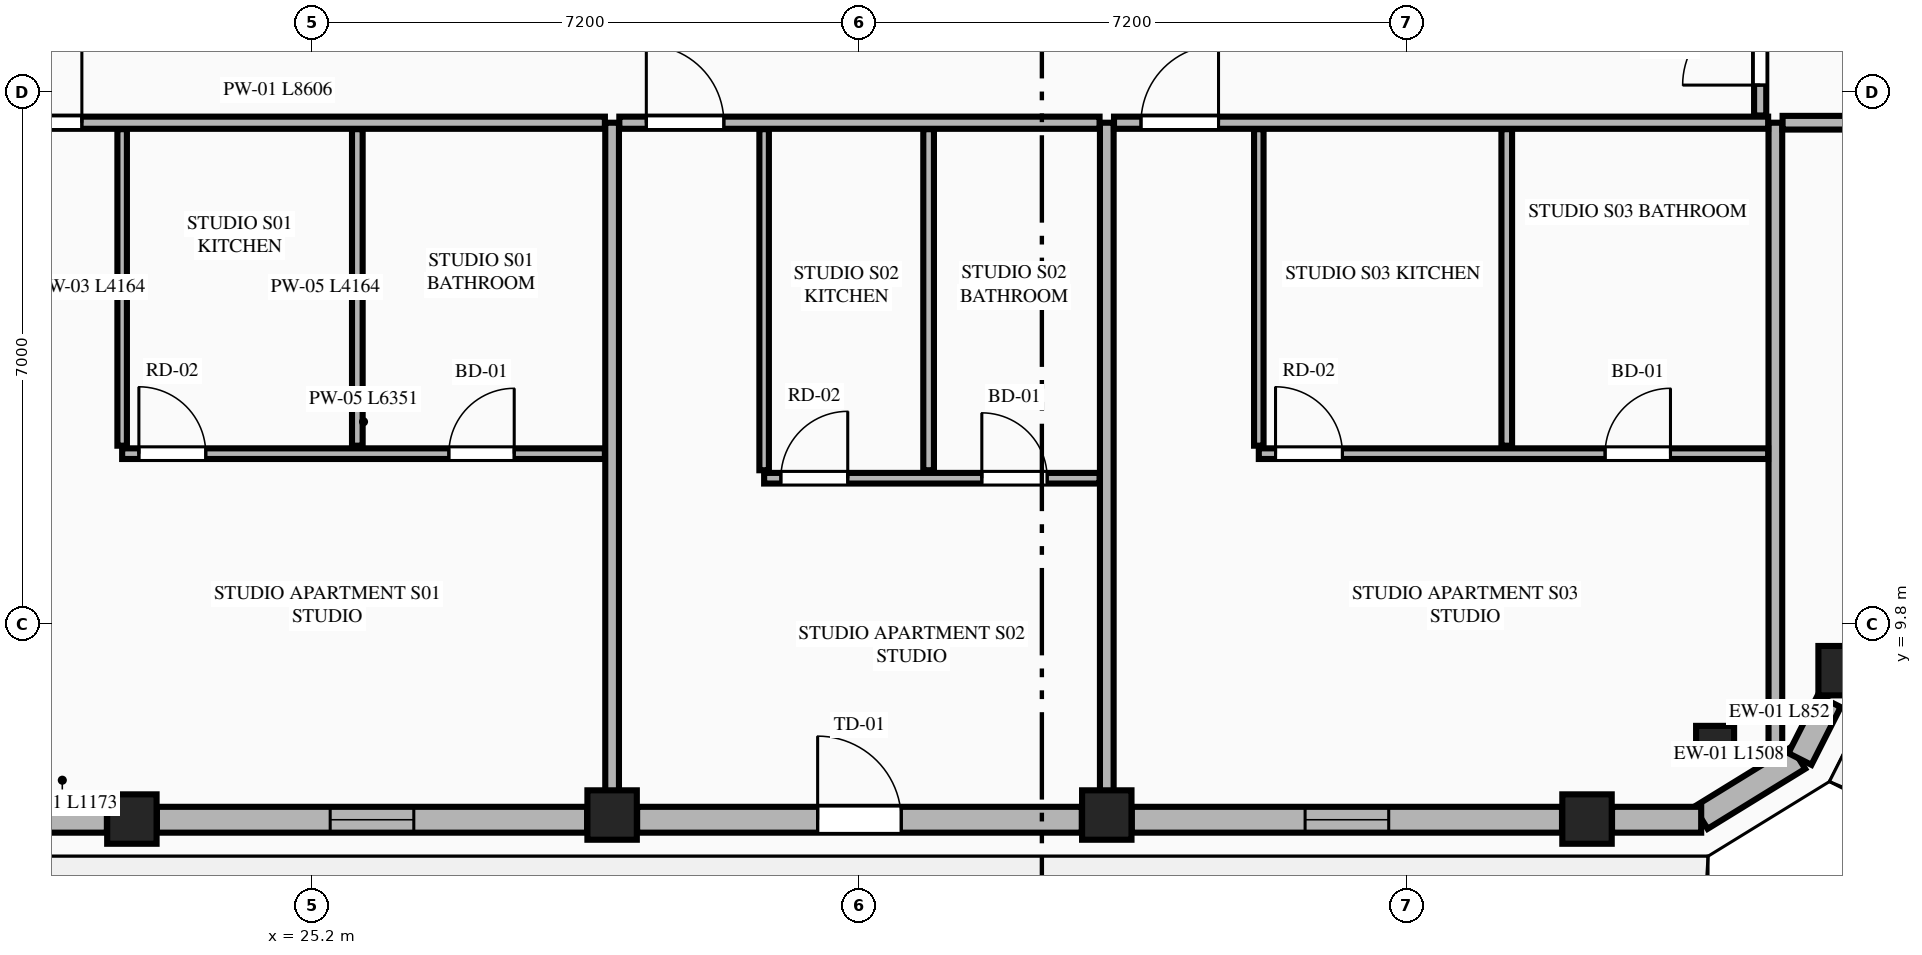
"""IFC4 building model, lengths in metres.
Left out: names, types, materials, properties, quantities, classifications, styles, units other than length and angle.
Written with IfcOpenShell. Run it as: python <this file> out.ifc"""

import sys

from ifc_helpers import new_model, si_unit, direction, frame, frame_2d, origin, origin_2d, place, context, subcontext, project, spatial, rectangle, extrude, element, fill, save


model = new_model("IFC4")
c1 = context("Model", 3, precision=1e-05, world=origin(), true_north=direction((0.0, 1.0)))
c2 = subcontext(c1, "Body", "Model", "MODEL_VIEW")
j1 = project(units=[si_unit("LENGTHUNIT", "METRE"), si_unit("PLANEANGLEUNIT", "RADIAN")], contexts=[c1])
p1 = place(None, origin())
s1 = spatial("IfcSite", under=j1, at=p1, CompositionType="ELEMENT")
p2 = place(p1, origin())
s2 = spatial("IfcBuilding", under=s1, at=p2, CompositionType="ELEMENT")
p3 = place(p2, frame((0.0, 0.0, 274.45)))
s3 = spatial("IfcBuildingStorey", under=s2, at=p3, CompositionType="ELEMENT", Elevation=274.45)
for number, where, z_axis, x_axis in (
    (1, (22.828, 7.239, 0.0), (0.0, 0.0, 1.0), (1.0, 0.0, 0.0)),
    (2, (29.146, 7.292, 0.0), (0.0, 0.0, 1.0), (1.0, 0.0, 0.0)),
    (3, (35.654, 7.292, 0.0), (0.0, 0.0, 1.0), (1.0, 0.0, 0.0)),
    (4, (41.972, 7.239, 0.0), (0.0, 0.0, 1.0), (1.0, 0.0, 0.0)),
    (5, (45.341, 9.191, 0.0), (0.0, 0.0, 1.0), (1.0, 0.0, 0.0)),
):
    element("IfcColumn", number, at=place(p3, frame(where, z_axis=z_axis, x_axis=x_axis)), inside=s3, PredefinedType="COLUMN", context=c2, shape_type="SweptSolid", body=[
        extrude(rectangle(XDim=0.65, YDim=0.65, at=origin_2d()), origin(), (0.0, 0.0, 1.0), 3.65),
    ])
p4 = place(p3, frame((43.657, 8.215, 0.0), z_axis=(0.0, 0.0, 1.0), x_axis=(0.865256437757, 0.501329529272, 0.0)))
e6 = element("IfcColumn", 6, at=p4, inside=s3, PredefinedType="PILASTER", context=c2, shape_type="SweptSolid", body=[
    extrude(rectangle(XDim=0.5, YDim=0.35, at=origin_2d()), origin(), (0.0, 0.0, 1.0), 3.65),
])
p5 = place(p3, frame((43.469, 7.255, 0.0), z_axis=(0.0, 0.0, 1.0), x_axis=(0.851680557619, 0.52406128246, 0.0)))
e7 = element("IfcWall", 7, at=p5, inside=s3, PredefinedType="STANDARD", context=c2, shape_type="SweptSolid", body=[
    extrude(rectangle(XDim=1.508, YDim=0.34, at=frame_2d((0.754, 0.0))), origin(), (0.0, 0.0, 1.0), 3.37),
])
p6 = place(p3, frame((21.326, 7.23, 0.0), z_axis=(0.0, 0.0, 1.0), x_axis=(1.0, 0.0, 0.0)))
e8 = element("IfcWall", 8, at=p6, inside=s3, PredefinedType="STANDARD", context=c2, shape_type="SweptSolid", body=[
    extrude(rectangle(XDim=1.173, YDim=0.34, at=frame_2d((0.586, 0.0))), origin(), (0.0, 0.0, 1.0), 3.37),
])
p7 = place(p3, frame((23.157, 7.23, 0.0), z_axis=(0.0, 0.0, 1.0), x_axis=(1.0, 0.0, 0.0)))
e9 = element("IfcWall", 9, at=p7, inside=s3, PredefinedType="STANDARD", context=c2, shape_type="SweptSolid", body=[
    extrude(rectangle(XDim=5.66, YDim=0.34, at=frame_2d((2.83, 0.0))), origin(), (0.0, 0.0, 1.0), 2.46),
])
p8 = place(p7, frame((2.28, 0.0, 0.75)))
e10 = element("IfcOpeningElement", 10, at=p8, cuts=e9, PredefinedType="OPENING", context=c2, shape_type="SweptSolid", body=[
    extrude(rectangle(XDim=1.1, YDim=1.56, at=frame_2d((0.55, 0.78))), frame((0.0, 0.18, 0.0), z_axis=(0.0, -1.0, 0.0), x_axis=(1.0, 0.0, 0.0)), (0.0, 0.0, 1.0), 0.36),
])
p9 = place(p3, frame((29.475, 7.23, 0.0), z_axis=(0.0, 0.0, 1.0), x_axis=(1.0, 0.0, 0.0)))
e11 = element("IfcWall", 11, at=p9, inside=s3, PredefinedType="STANDARD", context=c2, shape_type="SweptSolid", body=[
    extrude(rectangle(XDim=5.85, YDim=0.34, at=frame_2d((2.925, 0.0))), origin(), (0.0, 0.0, 1.0), 2.46),
])
p10 = place(p9, frame((2.375, 0.0, 0.0)))
e12 = element("IfcOpeningElement", 12, at=p10, cuts=e11, PredefinedType="OPENING", context=c2, shape_type="SweptSolid", body=[
    extrude(rectangle(XDim=1.1, YDim=2.25, at=frame_2d((0.55, 1.125))), frame((0.0, 0.18, 0.0), z_axis=(0.0, -1.0, 0.0), x_axis=(1.0, 0.0, 0.0)), (0.0, 0.0, 1.0), 0.36),
])
p11 = place(p3, frame((35.983, 7.23, 0.0), z_axis=(0.0, 0.0, 1.0), x_axis=(1.0, 0.0, 0.0)))
e13 = element("IfcWall", 13, at=p11, inside=s3, PredefinedType="STANDARD", context=c2, shape_type="SweptSolid", body=[
    extrude(rectangle(XDim=5.66, YDim=0.34, at=frame_2d((2.83, 0.0))), origin(), (0.0, 0.0, 1.0), 2.46),
])
p12 = place(p11, frame((2.28, 0.0, 0.75)))
e14 = element("IfcOpeningElement", 14, at=p12, cuts=e13, PredefinedType="OPENING", context=c2, shape_type="SweptSolid", body=[
    extrude(rectangle(XDim=1.1, YDim=1.56, at=frame_2d((0.55, 0.78))), frame((0.0, 0.18, 0.0), z_axis=(0.0, -1.0, 0.0), x_axis=(1.0, 0.0, 0.0)), (0.0, 0.0, 1.0), 0.36),
])
p13 = place(p3, frame((42.301, 7.23, 0.0), z_axis=(0.0, 0.0, 1.0), x_axis=(1.0, 0.0, 0.0)))
e15 = element("IfcWall", 15, at=p13, inside=s3, PredefinedType="STANDARD", context=c2, shape_type="SweptSolid", body=[
    extrude(rectangle(XDim=1.173, YDim=0.34, at=frame_2d((0.586, 0.0))), origin(), (0.0, 0.0, 1.0), 3.37),
])
p14 = place(p3, frame((44.773, 8.029, 0.0), z_axis=(0.0, 0.0, 1.0), x_axis=(0.451907025977, 0.8920650424, 0.0)))
e16 = element("IfcWall", 16, at=p14, inside=s3, PredefinedType="STANDARD", context=c2, shape_type="SweptSolid", body=[
    extrude(rectangle(XDim=0.852, YDim=0.34, at=frame_2d((0.426, 0.0))), origin(), (0.0, 0.0, 1.0), 3.37),
])
for number, where, z_axis, x_axis in (
    (17, (29.146, 7.405, 0.0), (0.0, 0.0, 1.0), (0.0, 1.0, 0.0)),
    (18, (35.654, 7.405, 0.0), (0.0, 0.0, 1.0), (0.0, 1.0, 0.0)),
):
    element("IfcWall", number, at=place(p3, frame(where, z_axis=z_axis, x_axis=x_axis)), inside=s3, PredefinedType="PARTITIONING", context=c2, shape_type="SweptSolid", body=[
        extrude(rectangle(XDim=8.995, YDim=0.18, at=frame_2d((4.498, 0.0))), origin(), (0.0, 0.0, 1.0), 2.294),
    ])
p15 = place(p3, frame((44.45, 8.119, 0.0), z_axis=(0.0, 0.0, 1.0), x_axis=(0.0, 1.0, 0.0)))
e19 = element("IfcWall", 19, at=p15, inside=s3, PredefinedType="PARTITIONING", context=c2, shape_type="SweptSolid", body=[
    extrude(rectangle(XDim=8.281, YDim=0.18, at=frame_2d((4.141, 0.0))), origin(), (0.0, 0.0, 1.0), 3.37),
])
p16 = place(p3, frame((20.445, 16.4, 0.0), z_axis=(0.0, 0.0, 1.0), x_axis=(1.0, 0.0, 0.0)))
e20 = element("IfcWall", 20, at=p16, inside=s3, PredefinedType="PARTITIONING", context=c2, shape_type="SweptSolid", body=[
    extrude(rectangle(XDim=8.606, YDim=0.16, at=frame_2d((4.303, 0.0))), origin(), (0.0, 0.0, 1.0), 3.37),
])
p17 = place(p16, frame((0.705, 0.0, 0.0)))
e21 = element("IfcOpeningElement", 21, at=p17, cuts=e20, PredefinedType="OPENING", context=c2, shape_type="SweptSolid", body=[
    extrude(rectangle(XDim=1.02, YDim=2.25, at=frame_2d((0.51, 1.125))), frame((0.0, 0.09, 0.0), z_axis=(0.0, -1.0, 0.0), x_axis=(1.0, 0.0, 0.0)), (0.0, 0.0, 1.0), 0.18),
])
p18 = place(p3, frame((22.7, 12.151, 0.0), z_axis=(0.0, 0.0, 1.0), x_axis=(0.0, 1.0, 0.0)))
e22 = element("IfcWall", 22, at=p18, inside=s3, PredefinedType="PARTITIONING", context=c2, shape_type="SweptSolid", body=[
    extrude(rectangle(XDim=4.164, YDim=0.125, at=frame_2d((2.082, 0.0))), origin(), (0.0, 0.0, 1.0), 2.677),
])
p19 = place(p3, frame((22.7, 12.046, 0.0), z_axis=(0.0, 0.0, 1.0), x_axis=(1.0, 0.0, 0.0)))
e23 = element("IfcWall", 23, at=p19, inside=s3, PredefinedType="PLUMBINGWALL", context=c2, shape_type="SweptSolid", body=[
    extrude(rectangle(XDim=6.351, YDim=0.14, at=frame_2d((3.176, 0.0))), origin(), (0.0, 0.0, 1.0), 3.37),
])
p20 = place(p19, frame((4.298, 0.0, 0.0)))
e24 = element("IfcOpeningElement", 24, at=p20, cuts=e23, PredefinedType="OPENING", context=c2, shape_type="SweptSolid", body=[
    extrude(rectangle(XDim=0.86, YDim=2.1, at=frame_2d((0.43, 1.05))), frame((0.0, 0.08, 0.0), z_axis=(0.0, -1.0, 0.0), x_axis=(1.0, 0.0, 0.0)), (0.0, 0.0, 1.0), 0.16),
])
p21 = place(p19, frame((0.22, 0.0, 0.0)))
e25 = element("IfcOpeningElement", 25, at=p21, cuts=e23, PredefinedType="OPENING", context=c2, shape_type="SweptSolid", body=[
    extrude(rectangle(XDim=0.88, YDim=2.15, at=frame_2d((0.44, 1.075))), frame((0.0, 0.08, 0.0), z_axis=(0.0, -1.0, 0.0), x_axis=(1.0, 0.0, 0.0)), (0.0, 0.0, 1.0), 0.16),
])
p22 = place(p3, frame((25.794, 12.151, 0.0), z_axis=(0.0, 0.0, 1.0), x_axis=(0.0, 1.0, 0.0)))
e26 = element("IfcWall", 26, at=p22, inside=s3, PredefinedType="PLUMBINGWALL", context=c2, shape_type="SweptSolid", body=[
    extrude(rectangle(XDim=4.164, YDim=0.14, at=frame_2d((2.082, 0.0))), origin(), (0.0, 0.0, 1.0), 3.37),
])
p23 = place(p3, frame((29.241, 16.4, 0.0), z_axis=(0.0, 0.0, 1.0), x_axis=(1.0, 0.0, 0.0)))
e27 = element("IfcWall", 27, at=p23, inside=s3, PredefinedType="PARTITIONING", context=c2, shape_type="SweptSolid", body=[
    extrude(rectangle(XDim=6.318, YDim=0.16, at=frame_2d((3.159, 0.0))), origin(), (0.0, 0.0, 1.0), 3.37),
])
p24 = place(p23, frame((0.355, 0.0, 0.0)))
e28 = element("IfcOpeningElement", 28, at=p24, cuts=e27, PredefinedType="OPENING", context=c2, shape_type="SweptSolid", body=[
    extrude(rectangle(XDim=1.02, YDim=2.25, at=frame_2d((0.51, 1.125))), frame((0.0, 0.09, 0.0), z_axis=(0.0, -1.0, 0.0), x_axis=(1.0, 0.0, 0.0)), (0.0, 0.0, 1.0), 0.18),
])
p25 = place(p3, frame((31.146, 11.828, 0.0), z_axis=(0.0, 0.0, 1.0), x_axis=(0.0, 1.0, 0.0)))
e29 = element("IfcWall", 29, at=p25, inside=s3, PredefinedType="PARTITIONING", context=c2, shape_type="SweptSolid", body=[
    extrude(rectangle(XDim=4.487, YDim=0.125, at=frame_2d((2.244, 0.0))), origin(), (0.0, 0.0, 1.0), 3.37),
])
p26 = place(p3, frame((31.146, 11.723, 0.0), z_axis=(0.0, 0.0, 1.0), x_axis=(1.0, 0.0, 0.0)))
e30 = element("IfcWall", 30, at=p26, inside=s3, PredefinedType="PLUMBINGWALL", context=c2, shape_type="SweptSolid", body=[
    extrude(rectangle(XDim=4.413, YDim=0.14, at=frame_2d((2.207, 0.0))), origin(), (0.0, 0.0, 1.0), 3.37),
])
p27 = place(p26, frame((2.864, 0.0, 0.0)))
e31 = element("IfcOpeningElement", 31, at=p27, cuts=e30, PredefinedType="OPENING", context=c2, shape_type="SweptSolid", body=[
    extrude(rectangle(XDim=0.86, YDim=2.1, at=frame_2d((0.43, 1.05))), frame((0.0, 0.08, 0.0), z_axis=(0.0, -1.0, 0.0), x_axis=(1.0, 0.0, 0.0)), (0.0, 0.0, 1.0), 0.16),
])
p28 = place(p26, frame((0.22, 0.0, 0.0)))
e32 = element("IfcOpeningElement", 32, at=p28, cuts=e30, PredefinedType="OPENING", context=c2, shape_type="SweptSolid", body=[
    extrude(rectangle(XDim=0.88, YDim=2.15, at=frame_2d((0.44, 1.075))), frame((0.0, 0.08, 0.0), z_axis=(0.0, -1.0, 0.0), x_axis=(1.0, 0.0, 0.0)), (0.0, 0.0, 1.0), 0.16),
])
p29 = place(p3, frame((33.31, 11.828, 0.0), z_axis=(0.0, 0.0, 1.0), x_axis=(0.0, 1.0, 0.0)))
e33 = element("IfcWall", 33, at=p29, inside=s3, PredefinedType="PLUMBINGWALL", context=c2, shape_type="SweptSolid", body=[
    extrude(rectangle(XDim=4.487, YDim=0.14, at=frame_2d((2.244, 0.0))), origin(), (0.0, 0.0, 1.0), 3.37),
])
p30 = place(p3, frame((35.749, 16.4, 0.0), z_axis=(0.0, 0.0, 1.0), x_axis=(1.0, 0.0, 0.0)))
e34 = element("IfcWall", 34, at=p30, inside=s3, PredefinedType="PARTITIONING", context=c2, shape_type="SweptSolid", body=[
    extrude(rectangle(XDim=8.606, YDim=0.16, at=frame_2d((4.303, 0.0))), origin(), (0.0, 0.0, 1.0), 3.37),
])
p31 = place(p30, frame((0.355, 0.0, 0.0)))
e35 = element("IfcOpeningElement", 35, at=p31, cuts=e34, PredefinedType="OPENING", context=c2, shape_type="SweptSolid", body=[
    extrude(rectangle(XDim=1.02, YDim=2.25, at=frame_2d((0.51, 1.125))), frame((0.0, 0.09, 0.0), z_axis=(0.0, -1.0, 0.0), x_axis=(1.0, 0.0, 0.0)), (0.0, 0.0, 1.0), 0.18),
])
p32 = place(p3, frame((37.654, 12.151, 0.0), z_axis=(0.0, 0.0, 1.0), x_axis=(0.0, 1.0, 0.0)))
e36 = element("IfcWall", 36, at=p32, inside=s3, PredefinedType="PARTITIONING", context=c2, shape_type="SweptSolid", body=[
    extrude(rectangle(XDim=4.164, YDim=0.125, at=frame_2d((2.082, 0.0))), origin(), (0.0, 0.0, 1.0), 3.37),
])
p33 = place(p3, frame((37.654, 12.046, 0.0), z_axis=(0.0, 0.0, 1.0), x_axis=(1.0, 0.0, 0.0)))
e37 = element("IfcWall", 37, at=p33, inside=s3, PredefinedType="PLUMBINGWALL", context=c2, shape_type="SweptSolid", body=[
    extrude(rectangle(XDim=6.701, YDim=0.14, at=frame_2d((3.351, 0.0))), origin(), (0.0, 0.0, 1.0), 3.37),
])
p34 = place(p33, frame((4.556, 0.0, 0.0)))
e38 = element("IfcOpeningElement", 38, at=p34, cuts=e37, PredefinedType="OPENING", context=c2, shape_type="SweptSolid", body=[
    extrude(rectangle(XDim=0.86, YDim=2.1, at=frame_2d((0.43, 1.05))), frame((0.0, 0.08, 0.0), z_axis=(0.0, -1.0, 0.0), x_axis=(1.0, 0.0, 0.0)), (0.0, 0.0, 1.0), 0.16),
])
p35 = place(p33, frame((0.22, 0.0, 0.0)))
e39 = element("IfcOpeningElement", 39, at=p35, cuts=e37, PredefinedType="OPENING", context=c2, shape_type="SweptSolid", body=[
    extrude(rectangle(XDim=0.88, YDim=2.15, at=frame_2d((0.44, 1.075))), frame((0.0, 0.08, 0.0), z_axis=(0.0, -1.0, 0.0), x_axis=(1.0, 0.0, 0.0)), (0.0, 0.0, 1.0), 0.16),
])
p36 = place(p3, frame((40.916, 12.151, 0.0), z_axis=(0.0, 0.0, 1.0), x_axis=(0.0, 1.0, 0.0)))
e40 = element("IfcWall", 40, at=p36, inside=s3, PredefinedType="PLUMBINGWALL", context=c2, shape_type="SweptSolid", body=[
    extrude(rectangle(XDim=4.164, YDim=0.14, at=frame_2d((2.082, 0.0))), origin(), (0.0, 0.0, 1.0), 3.37),
])
p37 = place(p3, frame((44.545, 16.4, 0.0), z_axis=(0.0, 0.0, 1.0), x_axis=(1.0, 0.0, 0.0)))
e41 = element("IfcWall", 41, at=p37, inside=s3, PredefinedType="PARTITIONING", context=c2, shape_type="SweptSolid", body=[
    extrude(rectangle(XDim=4.221, YDim=0.18, at=frame_2d((2.111, 0.0))), origin(), (0.0, 0.0, 1.0), 3.37),
])
p38 = place(p3, frame((44.25, 16.495, 0.0), z_axis=(0.0, 0.0, 1.0), x_axis=(0.0, 1.0, 0.0)))
e42 = element("IfcWall", 42, at=p38, inside=s3, PredefinedType="PARTITIONING", context=c2, shape_type="SweptSolid", body=[
    extrude(rectangle(XDim=18.41, YDim=0.16, at=frame_2d((9.205, 0.0))), origin(), (0.0, 0.0, 1.0), 3.057),
])
p39 = place(p38, frame((0.4, 0.0, 0.0)))
e43 = element("IfcOpeningElement", 43, at=p39, cuts=e42, PredefinedType="OPENING", context=c2, shape_type="SweptSolid", body=[
    extrude(rectangle(XDim=1.02, YDim=2.25, at=frame_2d((0.51, 1.125))), frame((0.0, 0.09, 0.0), z_axis=(0.0, -1.0, 0.0), x_axis=(1.0, 0.0, 0.0)), (0.0, 0.0, 1.0), 0.18),
])
p40 = place(p8, origin())
e44 = element("IfcWindow", 44, at=p40, inside=s3, PartitioningType="SINGLE_PANEL", PredefinedType="WINDOW", context=c2, shape_type="SweptSolid", body=[
    extrude(rectangle(XDim=1.1, YDim=1.56, at=frame_2d((0.55, 0.78))), frame((0.0, 0.03, 0.0), z_axis=(0.0, -1.0, 0.0), x_axis=(1.0, 0.0, 0.0)), (0.0, 0.0, 1.0), 0.06),
])
fill(e10, e44)
p41 = place(p10, origin())
e45 = element("IfcDoor", 45, at=p41, inside=s3, OperationType="SINGLE_SWING_LEFT", PredefinedType="DOOR", context=c2, shape_type="SweptSolid", body=[
    extrude(rectangle(XDim=1.1, YDim=2.25, at=frame_2d((0.55, 1.125))), frame((0.0, 0.025, 0.0), z_axis=(0.0, -1.0, 0.0), x_axis=(1.0, 0.0, 0.0)), (0.0, 0.0, 1.0), 0.05),
])
fill(e12, e45)
p42 = place(p12, origin())
e46 = element("IfcWindow", 46, at=p42, inside=s3, PartitioningType="SINGLE_PANEL", PredefinedType="WINDOW", context=c2, shape_type="SweptSolid", body=[
    extrude(rectangle(XDim=1.1, YDim=1.56, at=frame_2d((0.55, 0.78))), frame((0.0, 0.03, 0.0), z_axis=(0.0, -1.0, 0.0), x_axis=(1.0, 0.0, 0.0)), (0.0, 0.0, 1.0), 0.06),
])
fill(e14, e46)
p43 = place(p20, origin())
e47 = element("IfcDoor", 47, at=p43, inside=s3, OperationType="SINGLE_SWING_RIGHT", PredefinedType="DOOR", context=c2, shape_type="SweptSolid", body=[
    extrude(rectangle(XDim=0.86, YDim=2.1, at=frame_2d((0.43, 1.05))), frame((0.0, 0.025, 0.0), z_axis=(0.0, -1.0, 0.0), x_axis=(1.0, 0.0, 0.0)), (0.0, 0.0, 1.0), 0.05),
])
fill(e24, e47)
p44 = place(p17, origin())
e48 = element("IfcDoor", 48, at=p44, inside=s3, OperationType="SINGLE_SWING_RIGHT", PredefinedType="DOOR", context=c2, shape_type="SweptSolid", body=[
    extrude(rectangle(XDim=1.02, YDim=2.25, at=frame_2d((0.51, 1.125))), frame((0.0, 0.025, 0.0), z_axis=(0.0, -1.0, 0.0), x_axis=(1.0, 0.0, 0.0)), (0.0, 0.0, 1.0), 0.05),
])
fill(e21, e48)
p45 = place(p21, origin())
e49 = element("IfcDoor", 49, at=p45, inside=s3, OperationType="SINGLE_SWING_LEFT", PredefinedType="DOOR", context=c2, shape_type="SweptSolid", body=[
    extrude(rectangle(XDim=0.88, YDim=2.15, at=frame_2d((0.44, 1.075))), frame((0.0, 0.025, 0.0), z_axis=(0.0, -1.0, 0.0), x_axis=(1.0, 0.0, 0.0)), (0.0, 0.0, 1.0), 0.05),
])
fill(e25, e49)
p46 = place(p27, origin())
e50 = element("IfcDoor", 50, at=p46, inside=s3, OperationType="SINGLE_SWING_LEFT", PredefinedType="DOOR", context=c2, shape_type="SweptSolid", body=[
    extrude(rectangle(XDim=0.86, YDim=2.1, at=frame_2d((0.43, 1.05))), frame((0.0, 0.025, 0.0), z_axis=(0.0, -1.0, 0.0), x_axis=(1.0, 0.0, 0.0)), (0.0, 0.0, 1.0), 0.05),
])
fill(e31, e50)
p47 = place(p24, origin())
e51 = element("IfcDoor", 51, at=p47, inside=s3, OperationType="SINGLE_SWING_LEFT", PredefinedType="DOOR", context=c2, shape_type="SweptSolid", body=[
    extrude(rectangle(XDim=1.02, YDim=2.25, at=frame_2d((0.51, 1.125))), frame((0.0, 0.025, 0.0), z_axis=(0.0, -1.0, 0.0), x_axis=(1.0, 0.0, 0.0)), (0.0, 0.0, 1.0), 0.05),
])
fill(e28, e51)
p48 = place(p28, origin())
e52 = element("IfcDoor", 52, at=p48, inside=s3, OperationType="SINGLE_SWING_RIGHT", PredefinedType="DOOR", context=c2, shape_type="SweptSolid", body=[
    extrude(rectangle(XDim=0.88, YDim=2.15, at=frame_2d((0.44, 1.075))), frame((0.0, 0.025, 0.0), z_axis=(0.0, -1.0, 0.0), x_axis=(1.0, 0.0, 0.0)), (0.0, 0.0, 1.0), 0.05),
])
fill(e32, e52)
p49 = place(p34, origin())
e53 = element("IfcDoor", 53, at=p49, inside=s3, OperationType="SINGLE_SWING_RIGHT", PredefinedType="DOOR", context=c2, shape_type="SweptSolid", body=[
    extrude(rectangle(XDim=0.86, YDim=2.1, at=frame_2d((0.43, 1.05))), frame((0.0, 0.025, 0.0), z_axis=(0.0, -1.0, 0.0), x_axis=(1.0, 0.0, 0.0)), (0.0, 0.0, 1.0), 0.05),
])
fill(e38, e53)
p50 = place(p31, origin())
e54 = element("IfcDoor", 54, at=p50, inside=s3, OperationType="SINGLE_SWING_RIGHT", PredefinedType="DOOR", context=c2, shape_type="SweptSolid", body=[
    extrude(rectangle(XDim=1.02, YDim=2.25, at=frame_2d((0.51, 1.125))), frame((0.0, 0.025, 0.0), z_axis=(0.0, -1.0, 0.0), x_axis=(1.0, 0.0, 0.0)), (0.0, 0.0, 1.0), 0.05),
])
fill(e35, e54)
p51 = place(p35, origin())
e55 = element("IfcDoor", 55, at=p51, inside=s3, OperationType="SINGLE_SWING_LEFT", PredefinedType="DOOR", context=c2, shape_type="SweptSolid", body=[
    extrude(rectangle(XDim=0.88, YDim=2.15, at=frame_2d((0.44, 1.075))), frame((0.0, 0.025, 0.0), z_axis=(0.0, -1.0, 0.0), x_axis=(1.0, 0.0, 0.0)), (0.0, 0.0, 1.0), 0.05),
])
fill(e39, e55)
p52 = place(p39, origin())
e56 = element("IfcDoor", 56, at=p52, inside=s3, OperationType="SINGLE_SWING_LEFT", PredefinedType="DOOR", context=c2, shape_type="SweptSolid", body=[
    extrude(rectangle(XDim=1.02, YDim=2.25, at=frame_2d((0.51, 1.125))), frame((0.0, 0.025, 0.0), z_axis=(0.0, -1.0, 0.0), x_axis=(1.0, 0.0, 0.0)), (0.0, 0.0, 1.0), 0.05),
])
fill(e43, e56)
save(model, sys.argv[1])
